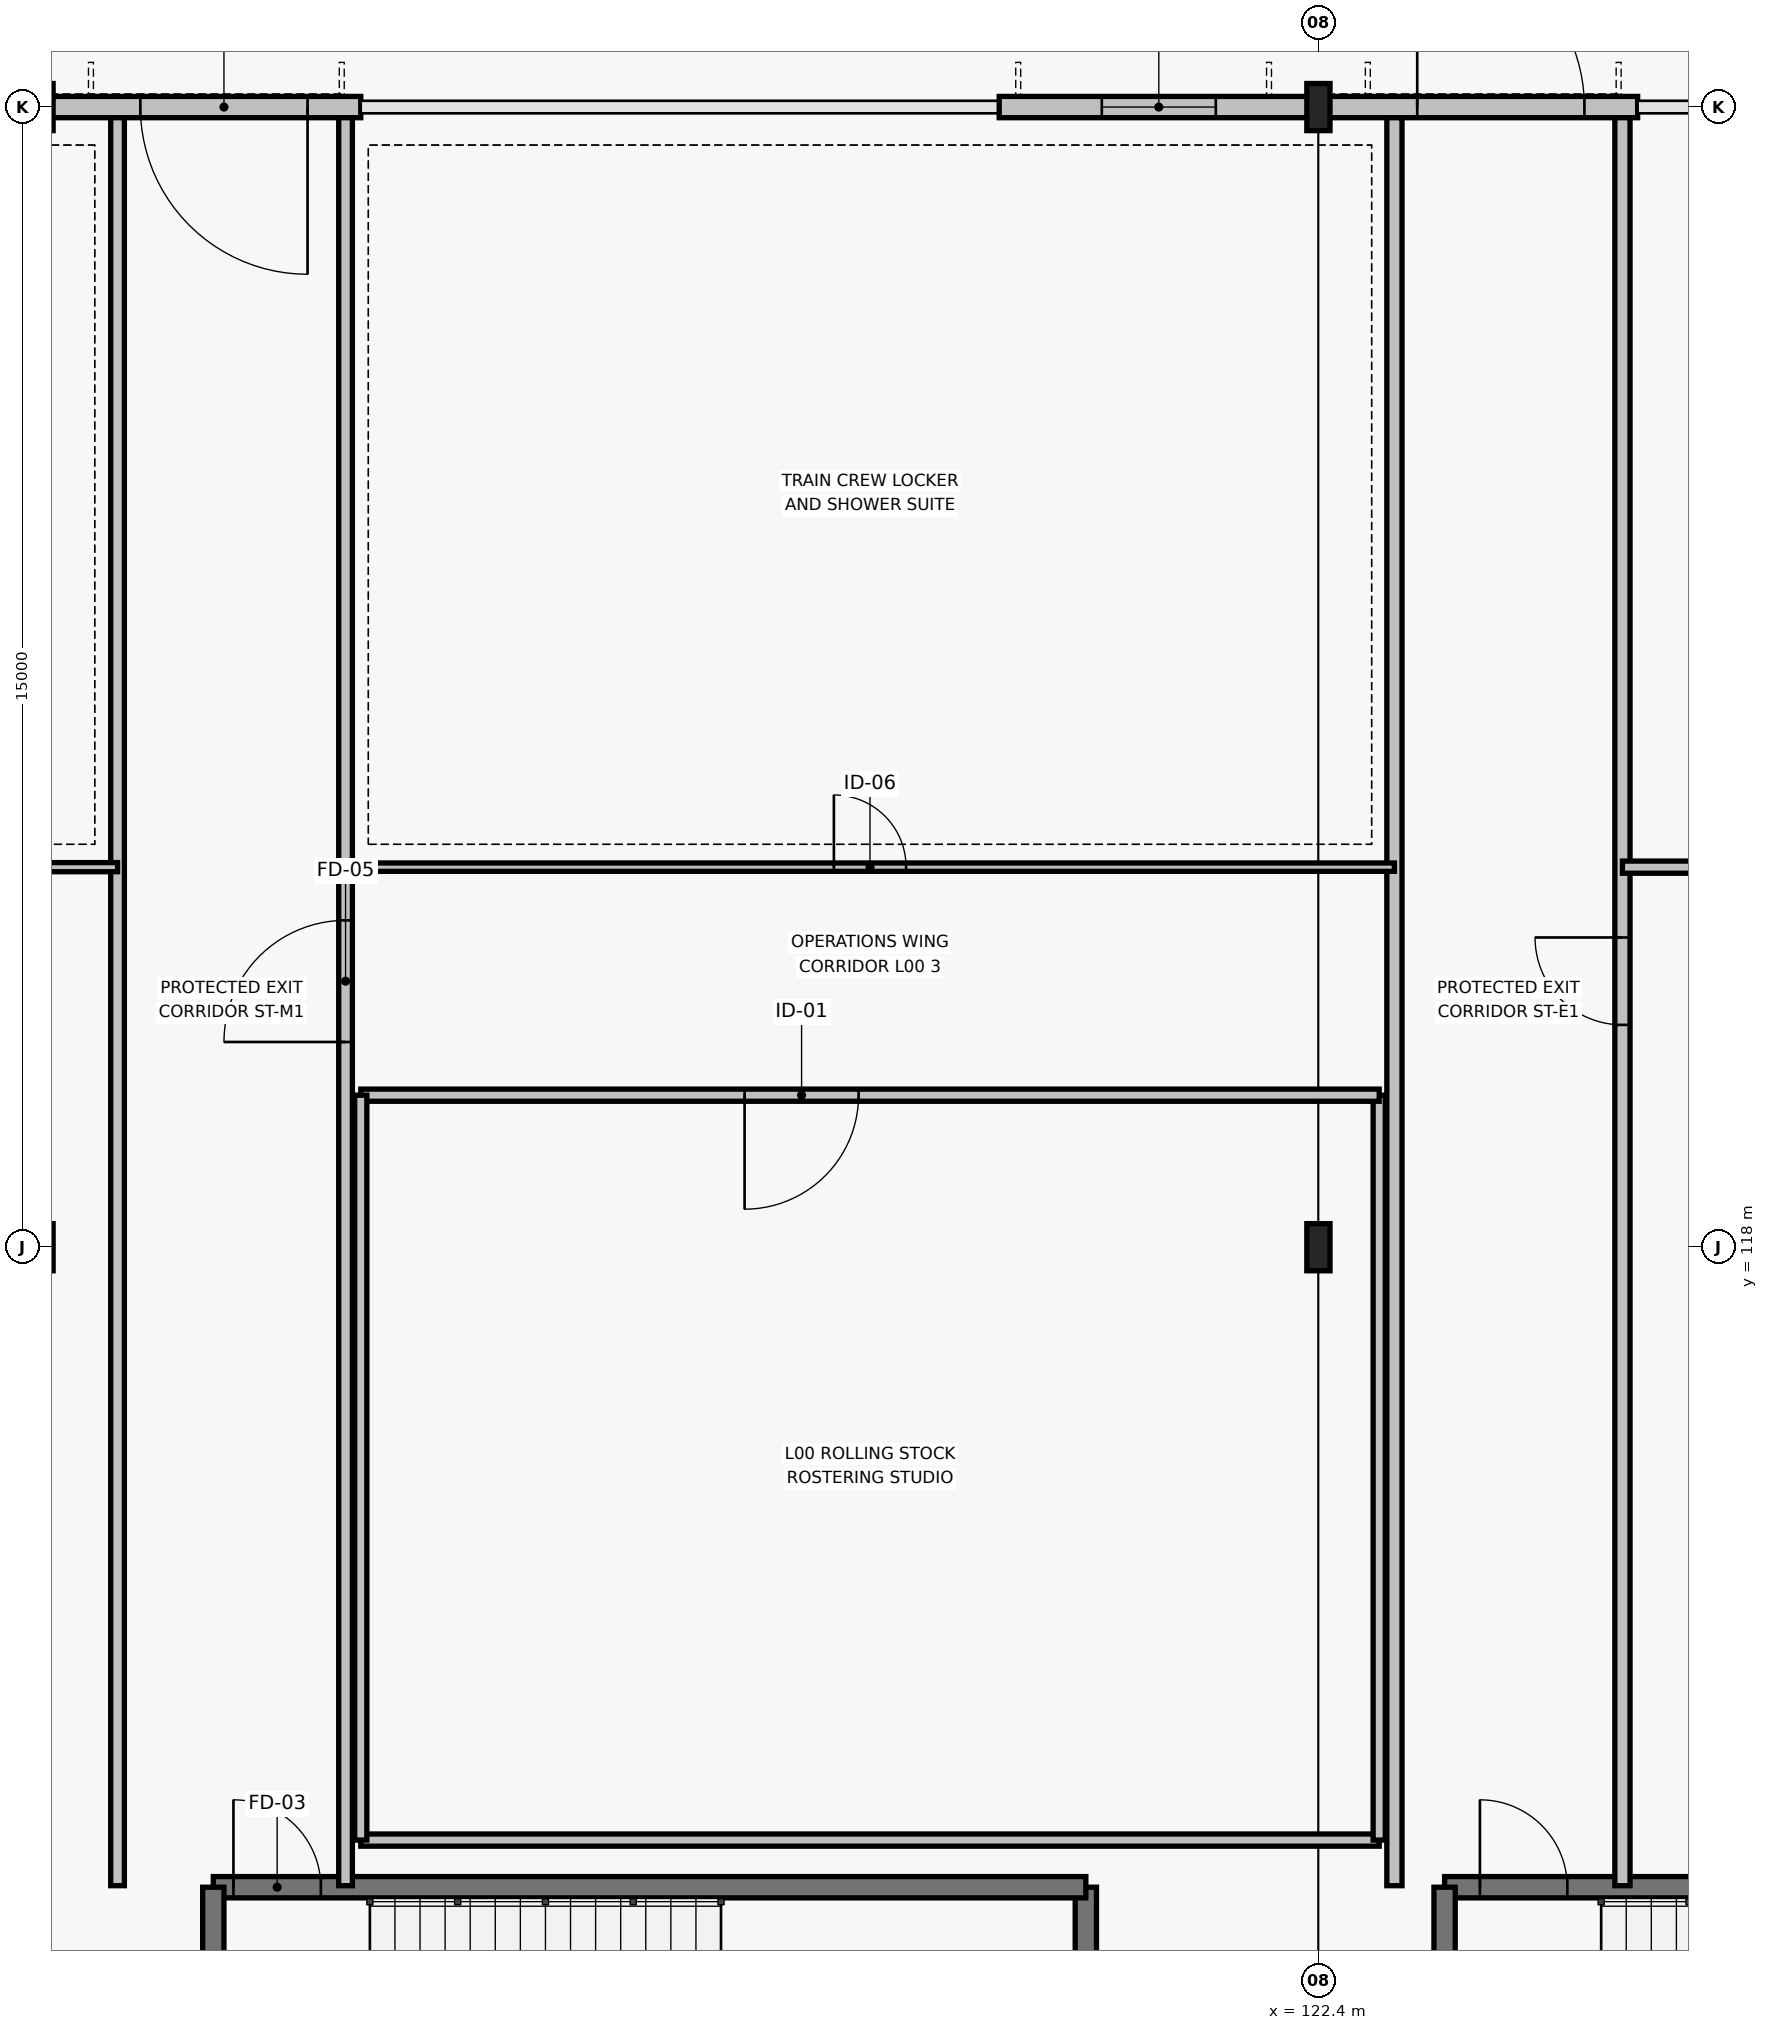
"""IFC4 building model, lengths in metres.
Left out: names, types, materials, properties, quantities, classifications, styles, units other than length and angle.
Written with IfcOpenShell. Run it as: python <this file> out.ifc"""

import sys

from ifc_helpers import new_model, si_unit, direction, frame, frame_2d, origin, origin_2d, place, context, subcontext, project, spatial, rectangle, i_section, extrude, element, fill, save


model = new_model("IFC4")
c1 = context("Model", 3, precision=1e-05, world=origin(), true_north=direction((0.0, 1.0)))
c2 = subcontext(c1, "Body", "Model", "MODEL_VIEW")
j1 = project(units=[si_unit("LENGTHUNIT", "METRE"), si_unit("PLANEANGLEUNIT", "RADIAN")], contexts=[c1])
p1 = place(None, origin())
s1 = spatial("IfcSite", under=j1, at=p1, CompositionType="ELEMENT")
p2 = place(p1, origin())
s2 = spatial("IfcBuilding", under=s1, at=p2, CompositionType="ELEMENT")
p3 = place(p2, origin())
s3 = spatial("IfcBuildingStorey", under=s2, at=p3, CompositionType="ELEMENT", Elevation=0.0)
for number, where, z_axis, x_axis in (
    (1, (105.6, 118.0, 0.0), (0.0, 0.0, 1.0), (1.0, 0.0, 0.0)),
    (2, (105.6, 133.0, 0.0), (0.0, 0.0, 1.0), (1.0, 0.0, 0.0)),
    (3, (122.4, 118.0, 0.0), (0.0, 0.0, 1.0), (1.0, 0.0, 0.0)),
    (4, (122.4, 133.0, 0.0), (0.0, 0.0, 1.0), (1.0, 0.0, 0.0)),
):
    element("IfcColumn", number, at=place(p3, frame(where, z_axis=z_axis, x_axis=x_axis)), inside=s3, PredefinedType="COLUMN", context=c2, shape_type="SweptSolid", body=[
        extrude(i_section(OverallWidth=0.305, OverallDepth=0.62, WebThickness=0.021, FlangeThickness=0.04, FilletRadius=0.027, at=origin_2d()), origin(), (0.0, 0.0, 1.0), 5.4),
    ])
p4 = place(p3, frame((105.6, 133.0, 0.0), z_axis=(0.0, 0.0, 1.0), x_axis=(1.0, 0.0, 0.0)))
e5 = element("IfcWall", 5, at=p4, inside=s3, PredefinedType="STANDARD", context=c2, shape_type="SweptSolid", body=[
    extrude(rectangle(XDim=4.2, YDim=0.28, at=frame_2d((2.1, 0.0))), origin(), (0.0, 0.0, 1.0), 4.765),
])
p5 = place(p4, frame((1.3, 0.0, 0.0)))
e6 = element("IfcOpeningElement", 6, at=p5, cuts=e5, PredefinedType="OPENING", context=c2, shape_type="SweptSolid", body=[
    extrude(rectangle(XDim=2.2, YDim=2.4, at=frame_2d((1.1, 1.2))), frame((0.0, 0.15, 0.0), z_axis=(0.0, -1.0, 0.0), x_axis=(1.0, 0.0, 0.0)), (0.0, 0.0, 1.0), 0.3),
])
p6 = place(p3, frame((118.2, 133.0, 0.0), z_axis=(0.0, 0.0, 1.0), x_axis=(1.0, 0.0, 0.0)))
e7 = element("IfcWall", 7, at=p6, inside=s3, PredefinedType="STANDARD", context=c2, shape_type="SweptSolid", body=[
    extrude(rectangle(XDim=4.2, YDim=0.28, at=frame_2d((2.1, 0.0))), origin(), (0.0, 0.0, 1.0), 4.765),
])
p7 = place(p6, frame((1.35, 0.0, 0.8)))
e8 = element("IfcOpeningElement", 8, at=p7, cuts=e7, PredefinedType="OPENING", context=c2, shape_type="SweptSolid", body=[
    extrude(rectangle(XDim=1.5, YDim=2.05, at=frame_2d((0.75, 1.025))), frame((0.0, 0.15, 0.0), z_axis=(0.0, -1.0, 0.0), x_axis=(1.0, 0.0, 0.0)), (0.0, 0.0, 1.0), 0.3),
])
p8 = place(p3, frame((122.4, 133.0, 0.0), z_axis=(0.0, 0.0, 1.0), x_axis=(1.0, 0.0, 0.0)))
e9 = element("IfcWall", 9, at=p8, inside=s3, PredefinedType="STANDARD", context=c2, shape_type="SweptSolid", body=[
    extrude(rectangle(XDim=4.2, YDim=0.28, at=frame_2d((2.1, 0.0))), origin(), (0.0, 0.0, 1.0), 4.765),
])
p9 = place(p8, frame((1.3, 0.0, 0.0)))
e10 = element("IfcOpeningElement", 10, at=p9, cuts=e9, PredefinedType="OPENING", context=c2, shape_type="SweptSolid", body=[
    extrude(rectangle(XDim=2.2, YDim=2.4, at=frame_2d((1.1, 1.2))), frame((0.0, 0.15, 0.0), z_axis=(0.0, -1.0, 0.0), x_axis=(1.0, 0.0, 0.0)), (0.0, 0.0, 1.0), 0.3),
])
p10 = place(p3, frame((119.34, 105.26, 0.0), z_axis=(0.0, 0.0, 1.0), x_axis=(0.0, 1.0, 0.0)))
e11 = element("IfcWall", 11, at=p10, inside=s3, PredefinedType="SHEAR", context=c2, shape_type="SweptSolid", body=[
    extrude(rectangle(XDim=4.32, YDim=0.28, at=frame_2d((2.16, 0.0))), origin(), (0.0, 0.0, 1.0), 5.16),
])
p11 = place(p3, frame((119.34, 109.58, 0.0), z_axis=(0.0, 0.0, 1.0), x_axis=(-1.0, 0.0, 0.0)))
e12 = element("IfcWall", 12, at=p11, inside=s3, PredefinedType="SHEAR", context=c2, shape_type="SweptSolid", body=[
    extrude(rectangle(XDim=11.48, YDim=0.28, at=frame_2d((5.74, 0.0))), origin(), (0.0, 0.0, 1.0), 5.16),
])
p12 = place(p11, frame((10.065, 0.0, 0.0)))
e13 = element("IfcOpeningElement", 13, at=p12, cuts=e12, PredefinedType="OPENING", context=c2, shape_type="SweptSolid", body=[
    extrude(rectangle(XDim=1.15, YDim=2.2, at=frame_2d((0.575, 1.1))), frame((0.0, 0.15, 0.0), z_axis=(0.0, -1.0, 0.0), x_axis=(1.0, 0.0, 0.0)), (0.0, 0.0, 1.0), 0.3),
])
p13 = place(p3, frame((107.86, 109.58, 0.0), z_axis=(0.0, 0.0, 1.0), x_axis=(0.0, -1.0, 0.0)))
e14 = element("IfcWall", 14, at=p13, inside=s3, PredefinedType="SHEAR", context=c2, shape_type="SweptSolid", body=[
    extrude(rectangle(XDim=4.32, YDim=0.28, at=frame_2d((2.16, 0.0))), origin(), (0.0, 0.0, 1.0), 5.16),
])
p14 = place(p3, frame((135.54, 109.58, 0.0), z_axis=(0.0, 0.0, 1.0), x_axis=(-1.0, 0.0, 0.0)))
e15 = element("IfcWall", 15, at=p14, inside=s3, PredefinedType="SHEAR", context=c2, shape_type="SweptSolid", body=[
    extrude(rectangle(XDim=11.48, YDim=0.28, at=frame_2d((5.74, 0.0))), origin(), (0.0, 0.0, 1.0), 5.16),
])
p15 = place(p14, frame((9.865, 0.0, 0.0)))
e16 = element("IfcOpeningElement", 16, at=p15, cuts=e15, PredefinedType="OPENING", context=c2, shape_type="SweptSolid", body=[
    extrude(rectangle(XDim=1.15, YDim=2.2, at=frame_2d((0.575, 1.1))), frame((0.0, 0.15, 0.0), z_axis=(0.0, -1.0, 0.0), x_axis=(1.0, 0.0, 0.0)), (0.0, 0.0, 1.0), 0.3),
])
p16 = place(p3, frame((124.06, 109.58, 0.0), z_axis=(0.0, 0.0, 1.0), x_axis=(0.0, -1.0, 0.0)))
e17 = element("IfcWall", 17, at=p16, inside=s3, PredefinedType="SHEAR", context=c2, shape_type="SweptSolid", body=[
    extrude(rectangle(XDim=4.32, YDim=0.28, at=frame_2d((2.16, 0.0))), origin(), (0.0, 0.0, 1.0), 5.16),
])
p17 = place(p3, frame((109.6, 109.6, 0.0), z_axis=(0.0, 0.0, 1.0), x_axis=(0.0, 1.0, 0.0)))
e18 = element("IfcWall", 18, at=p17, inside=s3, PredefinedType="PARTITIONING", context=c2, shape_type="SweptSolid", body=[
    extrude(rectangle(XDim=23.26, YDim=0.18, at=frame_2d((11.63, 0.0))), origin(), (0.0, 0.0, 1.0), 5.16),
])
p18 = place(p17, frame((11.1, 0.0, 0.0)))
e19 = element("IfcOpeningElement", 19, at=p18, cuts=e18, PredefinedType="OPENING", context=c2, shape_type="SweptSolid", body=[
    extrude(rectangle(XDim=1.6, YDim=2.25, at=frame_2d((0.8, 1.125))), frame((0.0, 0.1, 0.0), z_axis=(0.0, -1.0, 0.0), x_axis=(1.0, 0.0, 0.0)), (0.0, 0.0, 1.0), 0.2),
])
p19 = place(p3, frame((106.6, 132.86, 0.0), z_axis=(0.0, 0.0, 1.0), x_axis=(0.0, -1.0, 0.0)))
e20 = element("IfcWall", 20, at=p19, inside=s3, PredefinedType="PARTITIONING", context=c2, shape_type="SweptSolid", body=[
    extrude(rectangle(XDim=23.26, YDim=0.18, at=frame_2d((11.63, 0.0))), origin(), (0.0, 0.0, 1.0), 5.16),
])
p20 = place(p3, frame((126.4, 109.6, 0.0), z_axis=(0.0, 0.0, 1.0), x_axis=(0.0, 1.0, 0.0)))
e21 = element("IfcWall", 21, at=p20, inside=s3, PredefinedType="PARTITIONING", context=c2, shape_type="SweptSolid", body=[
    extrude(rectangle(XDim=23.26, YDim=0.2, at=frame_2d((11.63, 0.0))), origin(), (0.0, 0.0, 1.0), 5.16),
])
p21 = place(p20, frame((12.475, 0.0, 0.0), z_axis=(0.0, 0.0, 1.0), x_axis=(-1.0, 0.0, 0.0)))
e22 = element("IfcOpeningElement", 22, at=p21, cuts=e21, PredefinedType="OPENING", context=c2, shape_type="SweptSolid", body=[
    extrude(rectangle(XDim=1.15, YDim=2.2, at=frame_2d((0.575, 1.1))), frame((0.0, 0.11, 0.0), z_axis=(0.0, -1.0, 0.0), x_axis=(1.0, 0.0, 0.0)), (0.0, 0.0, 1.0), 0.22),
])
p22 = place(p3, frame((123.4, 132.86, 0.0), z_axis=(0.0, 0.0, 1.0), x_axis=(0.0, -1.0, 0.0)))
e23 = element("IfcWall", 23, at=p22, inside=s3, PredefinedType="PARTITIONING", context=c2, shape_type="SweptSolid", body=[
    extrude(rectangle(XDim=23.26, YDim=0.2, at=frame_2d((11.63, 0.0))), origin(), (0.0, 0.0, 1.0), 5.16),
])
p23 = place(p3, frame((97.2, 123.0, 0.0), z_axis=(0.0, 0.0, 1.0), x_axis=(1.0, 0.0, 0.0)))
e24 = element("IfcWall", 24, at=p23, inside=s3, PredefinedType="PARTITIONING", context=c2, shape_type="SweptSolid", body=[
    extrude(rectangle(XDim=9.4, YDim=0.12, at=frame_2d((4.7, 0.0))), origin(), (0.0, 0.0, 1.0), 5.16),
])
p24 = place(p23, frame((4.1, 0.0, 0.0)))
e25 = element("IfcOpeningElement", 25, at=p24, cuts=e24, PredefinedType="OPENING", context=c2, shape_type="SweptSolid", body=[
    extrude(rectangle(XDim=1.0, YDim=2.15, at=frame_2d((0.5, 1.075))), frame((0.0, 0.07, 0.0), z_axis=(0.0, -1.0, 0.0), x_axis=(1.0, 0.0, 0.0)), (0.0, 0.0, 1.0), 0.14),
])
p25 = place(p3, frame((109.6, 123.0, 0.0), z_axis=(0.0, 0.0, 1.0), x_axis=(1.0, 0.0, 0.0)))
e26 = element("IfcWall", 26, at=p25, inside=s3, PredefinedType="MOVABLE", context=c2, shape_type="SweptSolid", body=[
    extrude(rectangle(XDim=13.8, YDim=0.11, at=frame_2d((6.9, 0.0))), origin(), (0.0, 0.0, 1.0), 5.16),
])
p26 = place(p25, frame((6.425, 0.0, 0.0)))
e27 = element("IfcOpeningElement", 27, at=p26, cuts=e26, PredefinedType="OPENING", context=c2, shape_type="SweptSolid", body=[
    extrude(rectangle(XDim=0.95, YDim=2.15, at=frame_2d((0.475, 1.075))), frame((0.0, 0.065, 0.0), z_axis=(0.0, -1.0, 0.0), x_axis=(1.0, 0.0, 0.0)), (0.0, 0.0, 1.0), 0.13),
])
p27 = place(p3, frame((126.4, 123.0, 0.0), z_axis=(0.0, 0.0, 1.0), x_axis=(1.0, 0.0, 0.0)))
e28 = element("IfcWall", 28, at=p27, inside=s3, PredefinedType="PARTITIONING", context=c2, shape_type="SweptSolid", body=[
    extrude(rectangle(XDim=10.0, YDim=0.16, at=frame_2d((5.0, 0.0))), origin(), (0.0, 0.0, 1.0), 5.16),
])
p28 = place(p27, frame((5.825, 0.0, 0.0), z_axis=(0.0, 0.0, 1.0), x_axis=(-1.0, 0.0, 0.0)))
e29 = element("IfcOpeningElement", 29, at=p28, cuts=e28, PredefinedType="OPENING", context=c2, shape_type="SweptSolid", body=[
    extrude(rectangle(XDim=1.45, YDim=2.25, at=frame_2d((0.725, 1.125))), frame((0.0, 0.09, 0.0), z_axis=(0.0, -1.0, 0.0), x_axis=(1.0, 0.0, 0.0)), (0.0, 0.0, 1.0), 0.18),
])
p29 = place(p3, frame((109.8, 110.2, 0.0), z_axis=(0.0, 0.0, 1.0), x_axis=(1.0, 0.0, 0.0)))
e30 = element("IfcWall", 30, at=p29, inside=s3, PredefinedType="PARTITIONING", context=c2, shape_type="SweptSolid", body=[
    extrude(rectangle(XDim=13.4, YDim=0.16, at=frame_2d((6.7, 0.0))), origin(), (0.0, 0.0, 1.0), 5.16),
])
p30 = place(p3, frame((123.2, 110.2, 0.0), z_axis=(0.0, 0.0, 1.0), x_axis=(0.0, 1.0, 0.0)))
e31 = element("IfcWall", 31, at=p30, inside=s3, PredefinedType="PARTITIONING", context=c2, shape_type="SweptSolid", body=[
    extrude(rectangle(XDim=9.8, YDim=0.16, at=frame_2d((4.9, 0.0))), origin(), (0.0, 0.0, 1.0), 4.655),
])
p31 = place(p3, frame((123.2, 120.0, 0.0), z_axis=(0.0, 0.0, 1.0), x_axis=(-1.0, 0.0, 0.0)))
e32 = element("IfcWall", 32, at=p31, inside=s3, PredefinedType="PARTITIONING", context=c2, shape_type="SweptSolid", body=[
    extrude(rectangle(XDim=13.4, YDim=0.16, at=frame_2d((6.7, 0.0))), origin(), (0.0, 0.0, 1.0), 5.16),
])
p32 = place(p31, frame((8.35, 0.0, 0.0), z_axis=(0.0, 0.0, 1.0), x_axis=(-1.0, 0.0, 0.0)))
e33 = element("IfcOpeningElement", 33, at=p32, cuts=e32, PredefinedType="OPENING", context=c2, shape_type="SweptSolid", body=[
    extrude(rectangle(XDim=1.5, YDim=2.25, at=frame_2d((0.75, 1.125))), frame((0.0, 0.09, 0.0), z_axis=(0.0, -1.0, 0.0), x_axis=(1.0, 0.0, 0.0)), (0.0, 0.0, 1.0), 0.18),
])
p33 = place(p3, frame((109.8, 120.0, 0.0), z_axis=(0.0, 0.0, 1.0), x_axis=(0.0, -1.0, 0.0)))
e34 = element("IfcWall", 34, at=p33, inside=s3, PredefinedType="PARTITIONING", context=c2, shape_type="SweptSolid", body=[
    extrude(rectangle(XDim=9.8, YDim=0.16, at=frame_2d((4.9, 0.0))), origin(), (0.0, 0.0, 1.0), 5.16),
])
p34 = place(p5, origin())
e35 = element("IfcDoor", 35, at=p34, inside=s3, OperationType="SINGLE_SWING_RIGHT", PredefinedType="DOOR", context=c2, shape_type="SweptSolid", body=[
    extrude(rectangle(XDim=2.2, YDim=2.4, at=frame_2d((1.1, 1.2))), frame((0.0, 0.025, 0.0), z_axis=(0.0, -1.0, 0.0), x_axis=(1.0, 0.0, 0.0)), (0.0, 0.0, 1.0), 0.05),
])
fill(e6, e35)
p35 = place(p7, origin())
e36 = element("IfcWindow", 36, at=p35, inside=s3, PartitioningType="SINGLE_PANEL", PredefinedType="WINDOW", context=c2, shape_type="SweptSolid", body=[
    extrude(rectangle(XDim=1.5, YDim=2.05, at=frame_2d((0.75, 1.025))), frame((0.0, 0.03, 0.0), z_axis=(0.0, -1.0, 0.0), x_axis=(1.0, 0.0, 0.0)), (0.0, 0.0, 1.0), 0.06),
])
fill(e8, e36)
p36 = place(p9, origin())
e37 = element("IfcDoor", 37, at=p36, inside=s3, OperationType="SINGLE_SWING_LEFT", PredefinedType="DOOR", context=c2, shape_type="SweptSolid", body=[
    extrude(rectangle(XDim=2.2, YDim=2.4, at=frame_2d((1.1, 1.2))), frame((0.0, 0.025, 0.0), z_axis=(0.0, -1.0, 0.0), x_axis=(1.0, 0.0, 0.0)), (0.0, 0.0, 1.0), 0.05),
])
fill(e10, e37)
p37 = place(p12, origin())
e38 = element("IfcDoor", 38, at=p37, inside=s3, OperationType="SINGLE_SWING_RIGHT", PredefinedType="DOOR", context=c2, shape_type="SweptSolid", body=[
    extrude(rectangle(XDim=1.15, YDim=2.2, at=frame_2d((0.575, 1.1))), frame((0.0, 0.025, 0.0), z_axis=(0.0, -1.0, 0.0), x_axis=(1.0, 0.0, 0.0)), (0.0, 0.0, 1.0), 0.05),
])
fill(e13, e38)
p38 = place(p15, origin())
e39 = element("IfcDoor", 39, at=p38, inside=s3, OperationType="SINGLE_SWING_RIGHT", PredefinedType="DOOR", context=c2, shape_type="SweptSolid", body=[
    extrude(rectangle(XDim=1.15, YDim=2.2, at=frame_2d((0.575, 1.1))), frame((0.0, 0.025, 0.0), z_axis=(0.0, -1.0, 0.0), x_axis=(1.0, 0.0, 0.0)), (0.0, 0.0, 1.0), 0.05),
])
fill(e16, e39)
p39 = place(p18, origin())
e40 = element("IfcDoor", 40, at=p39, inside=s3, OperationType="SINGLE_SWING_LEFT", PredefinedType="DOOR", context=c2, shape_type="SweptSolid", body=[
    extrude(rectangle(XDim=1.6, YDim=2.25, at=frame_2d((0.8, 1.125))), frame((0.0, 0.025, 0.0), z_axis=(0.0, -1.0, 0.0), x_axis=(1.0, 0.0, 0.0)), (0.0, 0.0, 1.0), 0.05),
])
fill(e19, e40)
p40 = place(p21, origin())
e41 = element("IfcDoor", 41, at=p40, inside=s3, OperationType="SINGLE_SWING_RIGHT", PredefinedType="DOOR", context=c2, shape_type="SweptSolid", body=[
    extrude(rectangle(XDim=1.15, YDim=2.2, at=frame_2d((0.575, 1.1))), frame((0.0, 0.025, 0.0), z_axis=(0.0, -1.0, 0.0), x_axis=(1.0, 0.0, 0.0)), (0.0, 0.0, 1.0), 0.05),
])
fill(e22, e41)
p41 = place(p26, origin())
e42 = element("IfcDoor", 42, at=p41, inside=s3, OperationType="SINGLE_SWING_LEFT", PredefinedType="DOOR", context=c2, shape_type="SweptSolid", body=[
    extrude(rectangle(XDim=0.95, YDim=2.15, at=frame_2d((0.475, 1.075))), frame((0.0, 0.025, 0.0), z_axis=(0.0, -1.0, 0.0), x_axis=(1.0, 0.0, 0.0)), (0.0, 0.0, 1.0), 0.05),
])
fill(e27, e42)
p42 = place(p32, origin())
e43 = element("IfcDoor", 43, at=p42, inside=s3, OperationType="SINGLE_SWING_RIGHT", PredefinedType="DOOR", context=c2, shape_type="SweptSolid", body=[
    extrude(rectangle(XDim=1.5, YDim=2.25, at=frame_2d((0.75, 1.125))), frame((0.0, 0.025, 0.0), z_axis=(0.0, -1.0, 0.0), x_axis=(1.0, 0.0, 0.0)), (0.0, 0.0, 1.0), 0.05),
])
fill(e33, e43)
save(model, sys.argv[1])
